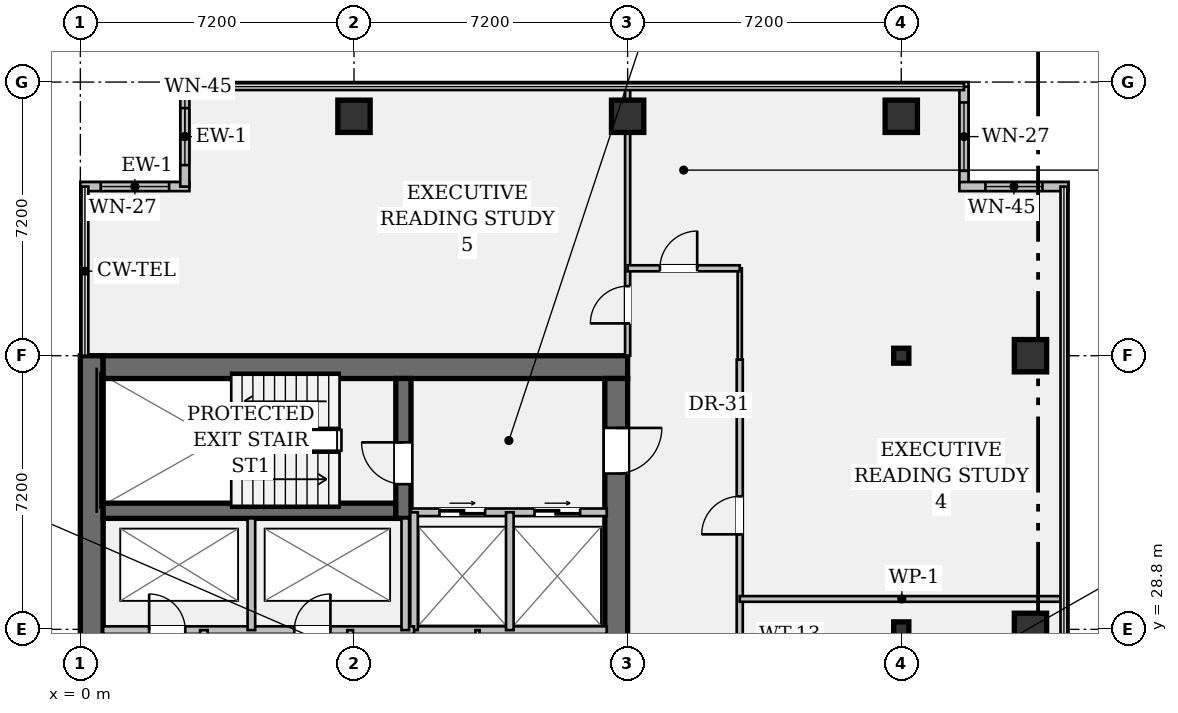
"""IFC4 building model, lengths in metres.
Left out: names, types, materials, properties, quantities, classifications, styles, units other than length and angle.
Written with IfcOpenShell. Run it as: python <this file> out.ifc"""

import sys

from ifc_helpers import new_model, si_unit, direction, frame, frame_2d, origin, origin_2d, place, context, subcontext, project, spatial, rectangle, hollow_rectangle, i_section, extrude, element, fill, save


model = new_model("IFC4")
c1 = context("Model", 3, precision=1e-05, world=origin(), true_north=direction((0.0, 1.0)))
c2 = subcontext(c1, "Body", "Model", "MODEL_VIEW")
j1 = project(units=[si_unit("LENGTHUNIT", "METRE"), si_unit("PLANEANGLEUNIT", "RADIAN")], contexts=[c1])
p1 = place(None, origin())
s1 = spatial("IfcSite", under=j1, at=p1, CompositionType="ELEMENT")
p2 = place(p1, origin())
s2 = spatial("IfcBuilding", under=s1, at=p2, CompositionType="ELEMENT")
p3 = place(p2, frame((0.0, 0.0, 159.95)))
s3 = spatial("IfcBuildingStorey", under=s2, at=p3, CompositionType="ELEMENT", Elevation=159.95)
p4 = place(p3, frame((0.3, 7.2, 0.0), z_axis=(0.0, 0.0, 1.0), x_axis=(0.0, 1.0, 0.0)))
e1 = element("IfcWall", 1, at=p4, inside=s3, PredefinedType="SHEAR", context=c2, shape_type="SweptSolid", body=[
    extrude(rectangle(XDim=28.8, YDim=0.6, at=frame_2d((14.4, 0.0))), origin(), (0.0, 0.0, 1.0), 3.58),
])
p5 = place(p3, frame((0.6, 35.7, 0.0), z_axis=(0.0, 0.0, 1.0), x_axis=(1.0, 0.0, 0.0)))
e2 = element("IfcWall", 2, at=p5, inside=s3, PredefinedType="SHEAR", context=c2, shape_type="SweptSolid", body=[
    extrude(rectangle(XDim=13.8, YDim=0.6, at=frame_2d((6.9, 0.0))), origin(), (0.0, 0.0, 1.0), 3.58),
])
p6 = place(p3, frame((14.1, 35.4, 0.0), z_axis=(0.0, 0.0, 1.0), x_axis=(0.0, -1.0, 0.0)))
e3 = element("IfcWall", 3, at=p6, inside=s3, PredefinedType="SHEAR", context=c2, shape_type="SweptSolid", body=[
    extrude(rectangle(XDim=27.6, YDim=0.6, at=frame_2d((13.8, 0.0))), origin(), (0.0, 0.0, 1.0), 3.58),
])
p7 = place(p6, frame((1.3, 0.0, 0.0)))
e4 = element("IfcOpeningElement", 4, at=p7, cuts=e3, PredefinedType="OPENING", context=c2, shape_type="SweptSolid", body=[
    extrude(rectangle(XDim=1.2, YDim=2.15, at=frame_2d((0.6, 1.075))), frame((0.0, 0.312, 0.0), z_axis=(0.0, -1.0, 0.0), x_axis=(1.0, 0.0, 0.0)), (0.0, 0.0, 1.0), 0.624),
])
p8 = place(p6, frame((25.25, 0.0, 0.0)))
e5 = element("IfcOpeningElement", 5, at=p8, cuts=e3, PredefinedType="OPENING", context=c2, shape_type="SweptSolid", body=[
    extrude(rectangle(XDim=1.2, YDim=2.15, at=frame_2d((0.6, 1.075))), frame((0.0, 0.312, 0.0), z_axis=(0.0, -1.0, 0.0), x_axis=(1.0, 0.0, 0.0)), (0.0, 0.0, 1.0), 0.624),
])
p9 = place(p6, frame((14.6, 0.0, 0.0)))
e6 = element("IfcOpeningElement", 6, at=p9, cuts=e3, PredefinedType="OPENING", context=c2, shape_type="SweptSolid", body=[
    extrude(rectangle(XDim=1.6, YDim=2.2, at=frame_2d((0.8, 1.1))), frame((0.0, 0.312, 0.0), z_axis=(0.0, -1.0, 0.0), x_axis=(1.0, 0.0, 0.0)), (0.0, 0.0, 1.0), 0.624),
])
p10 = place(p3, frame((0.6, 31.92, 0.0), z_axis=(0.0, 0.0, 1.0), x_axis=(1.0, 0.0, 0.0)))
e7 = element("IfcWall", 7, at=p10, inside=s3, PredefinedType="SHEAR", context=c2, shape_type="SweptSolid", body=[
    extrude(rectangle(XDim=7.7, YDim=0.4, at=frame_2d((3.85, 0.0))), origin(), (0.0, 0.0, 1.0), 3.58),
])
p11 = place(p3, frame((8.5, 31.72, 0.0), z_axis=(0.0, 0.0, 1.0), x_axis=(0.0, 1.0, 0.0)))
e8 = element("IfcWall", 8, at=p11, inside=s3, PredefinedType="SHEAR", context=c2, shape_type="SweptSolid", body=[
    extrude(rectangle(XDim=3.68, YDim=0.4, at=frame_2d((1.84, 0.0))), origin(), (0.0, 0.0, 1.0), 3.58),
])
p12 = place(p11, frame((0.9, 0.0, 0.0)))
e9 = element("IfcOpeningElement", 9, at=p12, cuts=e8, PredefinedType="OPENING", context=c2, shape_type="SweptSolid", body=[
    extrude(rectangle(XDim=1.1, YDim=2.15, at=frame_2d((0.55, 1.075))), frame((0.0, 0.212, 0.0), z_axis=(0.0, -1.0, 0.0), x_axis=(1.0, 0.0, 0.0)), (0.0, 0.0, 1.0), 0.424),
])
for number, where, z_axis, x_axis in (
    (10, (7.2, 42.3, 0.0), (0.0, 0.0, 1.0), (1.0, 0.0, 0.0)),
    (11, (14.4, 42.3, 0.0), (0.0, 0.0, 1.0), (1.0, 0.0, 0.0)),
):
    element("IfcColumn", number, at=place(p3, frame(where, z_axis=z_axis, x_axis=x_axis)), inside=s3, PredefinedType="COLUMN", context=c2, shape_type="SweptSolid", body=[
        extrude(hollow_rectangle(XDim=0.85, YDim=0.85, WallThickness=0.05, at=origin_2d()), origin(), (0.0, 0.0, 1.0), 3.58),
    ])
for number, where, z_axis, x_axis in (
    (12, (21.6, 28.8, 0.0), (0.0, 0.0, 1.0), (1.0, 0.0, 0.0)),
    (13, (21.6, 36.0, 0.0), (0.0, 0.0, 1.0), (1.0, 0.0, 0.0)),
):
    element("IfcColumn", number, at=place(p3, frame(where, z_axis=z_axis, x_axis=x_axis)), inside=s3, PredefinedType="COLUMN", context=c2, shape_type="SweptSolid", body=[
        extrude(i_section(OverallWidth=0.399, OverallDepth=0.394, WebThickness=0.023, FlangeThickness=0.037, FilletRadius=0.018, at=origin_2d()), origin(), (0.0, 0.0, 1.0), 3.58),
    ])
p13 = place(p3, frame((21.6, 42.3, 0.0), z_axis=(0.0, 0.0, 1.0), x_axis=(1.0, 0.0, 0.0)))
e14 = element("IfcColumn", 14, at=p13, inside=s3, PredefinedType="COLUMN", context=c2, shape_type="SweptSolid", body=[
    extrude(hollow_rectangle(XDim=0.85, YDim=0.85, WallThickness=0.05, at=origin_2d()), origin(), (0.0, 0.0, 1.0), 3.58),
])
for number, where, z_axis, x_axis in (
    (15, (25.0, 28.8, 0.0), (0.0, 0.0, 1.0), (1.0, 0.0, 0.0)),
    (16, (25.0, 36.0, 0.0), (0.0, 0.0, 1.0), (1.0, 0.0, 0.0)),
):
    element("IfcColumn", number, at=place(p3, frame(where, z_axis=z_axis, x_axis=x_axis)), inside=s3, PredefinedType="COLUMN", context=c2, shape_type="SweptSolid", body=[
        extrude(hollow_rectangle(XDim=0.85, YDim=0.85, WallThickness=0.05, at=origin_2d()), origin(), (0.0, 0.0, 1.0), 3.85),
    ])
p14 = place(p3, frame((0.0, 40.45, 0.0), z_axis=(0.0, 0.0, 1.0), x_axis=(1.0, 0.0, 0.0)))
e17 = element("IfcWall", 17, at=p14, inside=s3, PredefinedType="STANDARD", context=c2, shape_type="SweptSolid", body=[
    extrude(rectangle(XDim=2.87, YDim=0.24, at=frame_2d((1.435, 0.0))), origin(), (0.0, 0.0, 1.0), 3.58),
])
p15 = place(p14, frame((0.535, 0.0, 0.95)))
e18 = element("IfcOpeningElement", 18, at=p15, cuts=e17, PredefinedType="OPENING", context=c2, shape_type="SweptSolid", body=[
    extrude(rectangle(XDim=1.8, YDim=1.35, at=frame_2d((0.9, 0.675))), frame((0.0, 0.132, 0.0), z_axis=(0.0, -1.0, 0.0), x_axis=(1.0, 0.0, 0.0)), (0.0, 0.0, 1.0), 0.264),
])
p16 = place(p3, frame((2.75, 40.45, 0.0), z_axis=(0.0, 0.0, 1.0), x_axis=(0.0, 1.0, 0.0)))
e19 = element("IfcWall", 19, at=p16, inside=s3, PredefinedType="STANDARD", context=c2, shape_type="SweptSolid", body=[
    extrude(rectangle(XDim=2.63, YDim=0.24, at=frame_2d((1.315, 0.0))), origin(), (0.0, 0.0, 1.0), 3.58),
])
p17 = place(p16, frame((0.565, 0.0, 0.95)))
e20 = element("IfcOpeningElement", 20, at=p17, cuts=e19, PredefinedType="OPENING", context=c2, shape_type="SweptSolid", body=[
    extrude(rectangle(XDim=1.5, YDim=1.8, at=frame_2d((0.75, 0.9))), frame((0.0, 0.132, 0.0), z_axis=(0.0, -1.0, 0.0), x_axis=(1.0, 0.0, 0.0)), (0.0, 0.0, 1.0), 0.264),
])
p18 = place(p3, frame((23.25, 43.08, 0.0), z_axis=(0.0, 0.0, 1.0), x_axis=(0.0, -1.0, 0.0)))
e21 = element("IfcWall", 21, at=p18, inside=s3, PredefinedType="STANDARD", context=c2, shape_type="SweptSolid", body=[
    extrude(rectangle(XDim=2.63, YDim=0.24, at=frame_2d((1.315, 0.0))), origin(), (0.0, 0.0, 1.0), 3.58),
])
p19 = place(p18, frame((0.415, 0.0, 0.95)))
e22 = element("IfcOpeningElement", 22, at=p19, cuts=e21, PredefinedType="OPENING", context=c2, shape_type="SweptSolid", body=[
    extrude(rectangle(XDim=1.8, YDim=1.35, at=frame_2d((0.9, 0.675))), frame((0.0, 0.132, 0.0), z_axis=(0.0, -1.0, 0.0), x_axis=(1.0, 0.0, 0.0)), (0.0, 0.0, 1.0), 0.264),
])
p20 = place(p3, frame((23.13, 40.45, 0.0), z_axis=(0.0, 0.0, 1.0), x_axis=(1.0, 0.0, 0.0)))
e23 = element("IfcWall", 23, at=p20, inside=s3, PredefinedType="STANDARD", context=c2, shape_type="SweptSolid", body=[
    extrude(rectangle(XDim=2.87, YDim=0.24, at=frame_2d((1.435, 0.0))), origin(), (0.0, 0.0, 1.0), 3.58),
])
p21 = place(p20, frame((0.685, 0.0, 0.95)))
e24 = element("IfcOpeningElement", 24, at=p21, cuts=e23, PredefinedType="OPENING", context=c2, shape_type="SweptSolid", body=[
    extrude(rectangle(XDim=1.5, YDim=1.8, at=frame_2d((0.75, 0.9))), frame((0.0, 0.132, 0.0), z_axis=(0.0, -1.0, 0.0), x_axis=(1.0, 0.0, 0.0)), (0.0, 0.0, 1.0), 0.264),
])
p22 = place(p3, frame((8.7, 31.88, 0.0), z_axis=(0.0, 0.0, 1.0), x_axis=(1.0, 0.0, 0.0)))
e25 = element("IfcWall", 25, at=p22, inside=s3, PredefinedType="PARTITIONING", context=c2, shape_type="SweptSolid", body=[
    extrude(rectangle(XDim=5.15, YDim=0.2, at=frame_2d((2.575, 0.0))), origin(), (0.0, 0.0, 1.0), 3.58),
])
p23 = place(p22, frame((0.75, 0.0, 0.0)))
e26 = element("IfcOpeningElement", 26, at=p23, cuts=e25, PredefinedType="OPENING", context=c2, shape_type="SweptSolid", body=[
    extrude(rectangle(XDim=1.2, YDim=2.2, at=frame_2d((0.6, 1.1))), frame((0.0, 0.112, 0.0), z_axis=(0.0, -1.0, 0.0), x_axis=(1.0, 0.0, 0.0)), (0.0, 0.0, 1.0), 0.224),
])
p24 = place(p22, frame((3.25, 0.0, 0.0)))
e27 = element("IfcOpeningElement", 27, at=p24, cuts=e25, PredefinedType="OPENING", context=c2, shape_type="SweptSolid", body=[
    extrude(rectangle(XDim=1.2, YDim=2.2, at=frame_2d((0.6, 1.1))), frame((0.0, 0.112, 0.0), z_axis=(0.0, -1.0, 0.0), x_axis=(1.0, 0.0, 0.0)), (0.0, 0.0, 1.0), 0.224),
])
p25 = place(p3, frame((8.7, 28.78, 0.0), z_axis=(0.0, 0.0, 1.0), x_axis=(1.0, 0.0, 0.0)))
e28 = element("IfcWall", 28, at=p25, inside=s3, PredefinedType="PARTITIONING", context=c2, shape_type="SweptSolid", body=[
    extrude(rectangle(XDim=5.15, YDim=0.2, at=frame_2d((2.575, 0.0))), origin(), (0.0, 0.0, 1.0), 3.58),
])
for number, where, z_axis, x_axis in (
    (29, (8.78, 28.78, 0.0), (0.0, 0.0, 1.0), (0.0, 1.0, 0.0)),
    (30, (11.3, 28.78, 0.0), (0.0, 0.0, 1.0), (0.0, 1.0, 0.0)),
):
    element("IfcWall", number, at=place(p3, frame(where, z_axis=z_axis, x_axis=x_axis)), inside=s3, PredefinedType="PARTITIONING", context=c2, shape_type="SweptSolid", body=[
        extrude(rectangle(XDim=3.1, YDim=0.2, at=frame_2d((1.55, 0.0))), origin(), (0.0, 0.0, 1.0), 3.58),
    ])
p26 = place(p3, frame((0.6, 28.78, 0.0), z_axis=(0.0, 0.0, 1.0), x_axis=(1.0, 0.0, 0.0)))
e31 = element("IfcWall", 31, at=p26, inside=s3, PredefinedType="PARTITIONING", context=c2, shape_type="SweptSolid", body=[
    extrude(rectangle(XDim=8.18, YDim=0.2, at=frame_2d((4.09, 0.0))), origin(), (0.0, 0.0, 1.0), 3.58),
])
p27 = place(p26, frame((1.21, 0.0, 0.0)))
e32 = element("IfcOpeningElement", 32, at=p27, cuts=e31, PredefinedType="OPENING", context=c2, shape_type="SweptSolid", body=[
    extrude(rectangle(XDim=0.95, YDim=2.15, at=frame_2d((0.475, 1.075))), frame((0.0, 0.112, 0.0), z_axis=(0.0, -1.0, 0.0), x_axis=(1.0, 0.0, 0.0)), (0.0, 0.0, 1.0), 0.224),
])
p28 = place(p26, frame((5.03, 0.0, 0.0)))
e33 = element("IfcOpeningElement", 33, at=p28, cuts=e31, PredefinedType="OPENING", context=c2, shape_type="SweptSolid", body=[
    extrude(rectangle(XDim=0.95, YDim=2.15, at=frame_2d((0.475, 1.075))), frame((0.0, 0.112, 0.0), z_axis=(0.0, -1.0, 0.0), x_axis=(1.0, 0.0, 0.0)), (0.0, 0.0, 1.0), 0.224),
])
for number, where, z_axis, x_axis in (
    (34, (4.5, 28.78, 0.0), (0.0, 0.0, 1.0), (0.0, 1.0, 0.0)),
    (35, (8.55, 28.78, 0.0), (0.0, 0.0, 1.0), (0.0, 1.0, 0.0)),
):
    element("IfcWall", number, at=place(p3, frame(where, z_axis=z_axis, x_axis=x_axis)), inside=s3, PredefinedType="PARTITIONING", context=c2, shape_type="SweptSolid", body=[
        extrude(rectangle(XDim=2.94, YDim=0.2, at=frame_2d((1.47, 0.0))), origin(), (0.0, 0.0, 1.0), 3.58),
    ])
p29 = place(p3, frame((3.25, 15.7, 0.0), z_axis=(0.0, 0.0, 1.0), x_axis=(0.0, 1.0, 0.0)))
e36 = element("IfcWall", 36, at=p29, inside=s3, PredefinedType="PARTITIONING", context=c2, shape_type="SweptSolid", body=[
    extrude(rectangle(XDim=13.08, YDim=0.2, at=frame_2d((6.54, 0.0))), origin(), (0.0, 0.0, 1.0), 3.58),
])
p30 = place(p3, frame((7.1, 22.2, 0.0), z_axis=(0.0, 0.0, 1.0), x_axis=(0.0, 1.0, 0.0)))
e37 = element("IfcWall", 37, at=p30, inside=s3, PredefinedType="PARTITIONING", context=c2, shape_type="SweptSolid", body=[
    extrude(rectangle(XDim=6.58, YDim=0.15, at=frame_2d((3.29, 0.0))), origin(), (0.0, 0.0, 1.0), 3.58),
])
p31 = place(p3, frame((10.45, 22.2, 0.0), z_axis=(0.0, 0.0, 1.0), x_axis=(0.0, 1.0, 0.0)))
e38 = element("IfcWall", 38, at=p31, inside=s3, PredefinedType="PARTITIONING", context=c2, shape_type="SweptSolid", body=[
    extrude(rectangle(XDim=6.58, YDim=0.11, at=frame_2d((3.29, 0.0))), origin(), (0.0, 0.0, 1.0), 3.58),
])
p32 = place(p3, frame((17.35, 20.7, 0.0), z_axis=(0.0, 0.0, 1.0), x_axis=(0.0, 1.0, 0.0)))
e39 = element("IfcWall", 39, at=p32, inside=s3, PredefinedType="PARTITIONING", context=c2, shape_type="SweptSolid", body=[
    extrude(rectangle(XDim=15.2, YDim=0.16, at=frame_2d((7.6, 0.0))), origin(), (0.0, 0.0, 1.0), 2.869),
])
p33 = place(p32, frame((5.2, 0.0, 0.0)))
e40 = element("IfcOpeningElement", 40, at=p33, cuts=e39, PredefinedType="OPENING", context=c2, shape_type="SweptSolid", body=[
    extrude(rectangle(XDim=0.98, YDim=2.15, at=frame_2d((0.49, 1.075))), frame((0.0, 0.092, 0.0), z_axis=(0.0, -1.0, 0.0), x_axis=(1.0, 0.0, 0.0)), (0.0, 0.0, 1.0), 0.184),
])
p34 = place(p32, frame((10.6, 0.0, 0.0)))
e41 = element("IfcOpeningElement", 41, at=p34, cuts=e39, PredefinedType="OPENING", context=c2, shape_type="SweptSolid", body=[
    extrude(rectangle(XDim=1.0, YDim=2.15, at=frame_2d((0.5, 1.075))), frame((0.0, 0.092, 0.0), z_axis=(0.0, -1.0, 0.0), x_axis=(1.0, 0.0, 0.0)), (0.0, 0.0, 1.0), 0.184),
])
p35 = place(p3, frame((17.35, 29.6, 0.0), z_axis=(0.0, 0.0, 1.0), x_axis=(1.0, 0.0, 0.0)))
e42 = element("IfcWall", 42, at=p35, inside=s3, PredefinedType="PARTITIONING", context=c2, shape_type="SweptSolid", body=[
    extrude(rectangle(XDim=8.53, YDim=0.15, at=frame_2d((4.265, 0.0))), origin(), (0.0, 0.0, 1.0), 2.869),
])
p36 = place(p3, frame((14.4, 36.0, 0.0), z_axis=(0.0, 0.0, 1.0), x_axis=(0.0, 1.0, 0.0)))
e43 = element("IfcWall", 43, at=p36, inside=s3, PredefinedType="PARTITIONING", context=c2, shape_type="SweptSolid", body=[
    extrude(rectangle(XDim=7.08, YDim=0.135, at=frame_2d((3.54, 0.0))), origin(), (0.0, 0.0, 1.0), 2.869),
])
p37 = place(p36, frame((0.85, 0.0, 0.0)))
e44 = element("IfcOpeningElement", 44, at=p37, cuts=e43, PredefinedType="OPENING", context=c2, shape_type="SweptSolid", body=[
    extrude(rectangle(XDim=0.98, YDim=2.15, at=frame_2d((0.49, 1.075))), frame((0.0, 0.08, 0.0), z_axis=(0.0, -1.0, 0.0), x_axis=(1.0, 0.0, 0.0)), (0.0, 0.0, 1.0), 0.159),
])
p38 = place(p3, frame((17.35, 35.9, 0.0), z_axis=(0.0, 0.0, 1.0), x_axis=(0.0, 1.0, 0.0)))
e45 = element("IfcWall", 45, at=p38, inside=s3, PredefinedType="PARTITIONING", context=c2, shape_type="SweptSolid", body=[
    extrude(rectangle(XDim=2.4, YDim=0.11, at=frame_2d((1.2, 0.0))), origin(), (0.0, 0.0, 1.0), 2.869),
])
p39 = place(p3, frame((14.4, 38.3, 0.0), z_axis=(0.0, 0.0, 1.0), x_axis=(1.0, 0.0, 0.0)))
e46 = element("IfcWall", 46, at=p39, inside=s3, PredefinedType="PARTITIONING", context=c2, shape_type="SweptSolid", body=[
    extrude(rectangle(XDim=2.95, YDim=0.16, at=frame_2d((1.475, 0.0))), origin(), (0.0, 0.0, 1.0), 2.869),
])
p40 = place(p39, frame((0.85, 0.0, 0.0)))
e47 = element("IfcOpeningElement", 47, at=p40, cuts=e46, PredefinedType="OPENING", context=c2, shape_type="SweptSolid", body=[
    extrude(rectangle(XDim=0.98, YDim=2.15, at=frame_2d((0.49, 1.075))), frame((0.0, 0.092, 0.0), z_axis=(0.0, -1.0, 0.0), x_axis=(1.0, 0.0, 0.0)), (0.0, 0.0, 1.0), 0.184),
])
p41 = place(p15, origin())
e48 = element("IfcWindow", 48, at=p41, inside=s3, PartitioningType="SINGLE_PANEL", PredefinedType="WINDOW", context=c2, shape_type="SweptSolid", body=[
    extrude(rectangle(XDim=1.8, YDim=1.35, at=frame_2d((0.9, 0.675))), frame((0.0, 0.03, 0.0), z_axis=(0.0, -1.0, 0.0), x_axis=(1.0, 0.0, 0.0)), (0.0, 0.0, 1.0), 0.06),
])
fill(e18, e48)
p42 = place(p17, origin())
e49 = element("IfcWindow", 49, at=p42, inside=s3, PartitioningType="SINGLE_PANEL", PredefinedType="WINDOW", context=c2, shape_type="SweptSolid", body=[
    extrude(rectangle(XDim=1.5, YDim=1.8, at=frame_2d((0.75, 0.9))), frame((0.0, 0.03, 0.0), z_axis=(0.0, -1.0, 0.0), x_axis=(1.0, 0.0, 0.0)), (0.0, 0.0, 1.0), 0.06),
])
fill(e20, e49)
p43 = place(p19, origin())
e50 = element("IfcWindow", 50, at=p43, inside=s3, PartitioningType="SINGLE_PANEL", PredefinedType="WINDOW", context=c2, shape_type="SweptSolid", body=[
    extrude(rectangle(XDim=1.8, YDim=1.35, at=frame_2d((0.9, 0.675))), frame((0.0, 0.03, 0.0), z_axis=(0.0, -1.0, 0.0), x_axis=(1.0, 0.0, 0.0)), (0.0, 0.0, 1.0), 0.06),
])
fill(e22, e50)
p44 = place(p21, origin())
e51 = element("IfcWindow", 51, at=p44, inside=s3, PartitioningType="SINGLE_PANEL", PredefinedType="WINDOW", context=c2, shape_type="SweptSolid", body=[
    extrude(rectangle(XDim=1.5, YDim=1.8, at=frame_2d((0.75, 0.9))), frame((0.0, 0.03, 0.0), z_axis=(0.0, -1.0, 0.0), x_axis=(1.0, 0.0, 0.0)), (0.0, 0.0, 1.0), 0.06),
])
fill(e24, e51)
p45 = place(p12, origin())
e52 = element("IfcDoor", 52, at=p45, inside=s3, OperationType="SINGLE_SWING_RIGHT", PredefinedType="DOOR", context=c2, shape_type="SweptSolid", body=[
    extrude(rectangle(XDim=1.1, YDim=2.15, at=frame_2d((0.55, 1.075))), frame((0.0, 0.025, 0.0), z_axis=(0.0, -1.0, 0.0), x_axis=(1.0, 0.0, 0.0)), (0.0, 0.0, 1.0), 0.05),
])
fill(e9, e52)
p46 = place(p7, origin())
e53 = element("IfcDoor", 53, at=p46, inside=s3, OperationType="SINGLE_SWING_LEFT", PredefinedType="DOOR", context=c2, shape_type="SweptSolid", body=[
    extrude(rectangle(XDim=1.2, YDim=2.15, at=frame_2d((0.6, 1.075))), frame((0.0, 0.025, 0.0), z_axis=(0.0, -1.0, 0.0), x_axis=(1.0, 0.0, 0.0)), (0.0, 0.0, 1.0), 0.05),
])
fill(e4, e53)
p47 = place(p23, origin())
e54 = element("IfcDoor", 54, at=p47, inside=s3, OperationType="DOUBLE_DOOR_SLIDING", PredefinedType="DOOR", context=c2, shape_type="SweptSolid", body=[
    extrude(rectangle(XDim=1.2, YDim=2.2, at=frame_2d((0.6, 1.1))), frame((0.0, 0.025, 0.0), z_axis=(0.0, -1.0, 0.0), x_axis=(1.0, 0.0, 0.0)), (0.0, 0.0, 1.0), 0.05),
])
fill(e26, e54)
p48 = place(p24, origin())
e55 = element("IfcDoor", 55, at=p48, inside=s3, OperationType="DOUBLE_DOOR_SLIDING", PredefinedType="DOOR", context=c2, shape_type="SweptSolid", body=[
    extrude(rectangle(XDim=1.2, YDim=2.2, at=frame_2d((0.6, 1.1))), frame((0.0, 0.025, 0.0), z_axis=(0.0, -1.0, 0.0), x_axis=(1.0, 0.0, 0.0)), (0.0, 0.0, 1.0), 0.05),
])
fill(e27, e55)
p49 = place(p27, origin())
e56 = element("IfcDoor", 56, at=p49, inside=s3, OperationType="SINGLE_SWING_LEFT", PredefinedType="DOOR", context=c2, shape_type="SweptSolid", body=[
    extrude(rectangle(XDim=0.95, YDim=2.15, at=frame_2d((0.475, 1.075))), frame((0.0, 0.025, 0.0), z_axis=(0.0, -1.0, 0.0), x_axis=(1.0, 0.0, 0.0)), (0.0, 0.0, 1.0), 0.05),
])
fill(e32, e56)
p50 = place(p28, origin())
e57 = element("IfcDoor", 57, at=p50, inside=s3, OperationType="SINGLE_SWING_RIGHT", PredefinedType="DOOR", context=c2, shape_type="SweptSolid", body=[
    extrude(rectangle(XDim=0.95, YDim=2.15, at=frame_2d((0.475, 1.075))), frame((0.0, 0.025, 0.0), z_axis=(0.0, -1.0, 0.0), x_axis=(1.0, 0.0, 0.0)), (0.0, 0.0, 1.0), 0.05),
])
fill(e33, e57)
p51 = place(p34, origin())
e58 = element("IfcDoor", 58, at=p51, inside=s3, OperationType="SINGLE_SWING_LEFT", PredefinedType="DOOR", context=c2, shape_type="SweptSolid", body=[
    extrude(rectangle(XDim=1.0, YDim=2.15, at=frame_2d((0.5, 1.075))), frame((0.0, 0.025, 0.0), z_axis=(0.0, -1.0, 0.0), x_axis=(1.0, 0.0, 0.0)), (0.0, 0.0, 1.0), 0.05),
])
fill(e41, e58)
p52 = place(p37, origin())
e59 = element("IfcDoor", 59, at=p52, inside=s3, OperationType="SINGLE_SWING_LEFT", PredefinedType="DOOR", context=c2, shape_type="SweptSolid", body=[
    extrude(rectangle(XDim=0.98, YDim=2.15, at=frame_2d((0.49, 1.075))), frame((0.0, 0.025, 0.0), z_axis=(0.0, -1.0, 0.0), x_axis=(1.0, 0.0, 0.0)), (0.0, 0.0, 1.0), 0.05),
])
fill(e44, e59)
p53 = place(p40, origin())
e60 = element("IfcDoor", 60, at=p53, inside=s3, OperationType="SINGLE_SWING_RIGHT", PredefinedType="DOOR", context=c2, shape_type="SweptSolid", body=[
    extrude(rectangle(XDim=0.98, YDim=2.15, at=frame_2d((0.49, 1.075))), frame((0.0, 0.025, 0.0), z_axis=(0.0, -1.0, 0.0), x_axis=(1.0, 0.0, 0.0)), (0.0, 0.0, 1.0), 0.05),
])
fill(e47, e60)
save(model, sys.argv[1])
